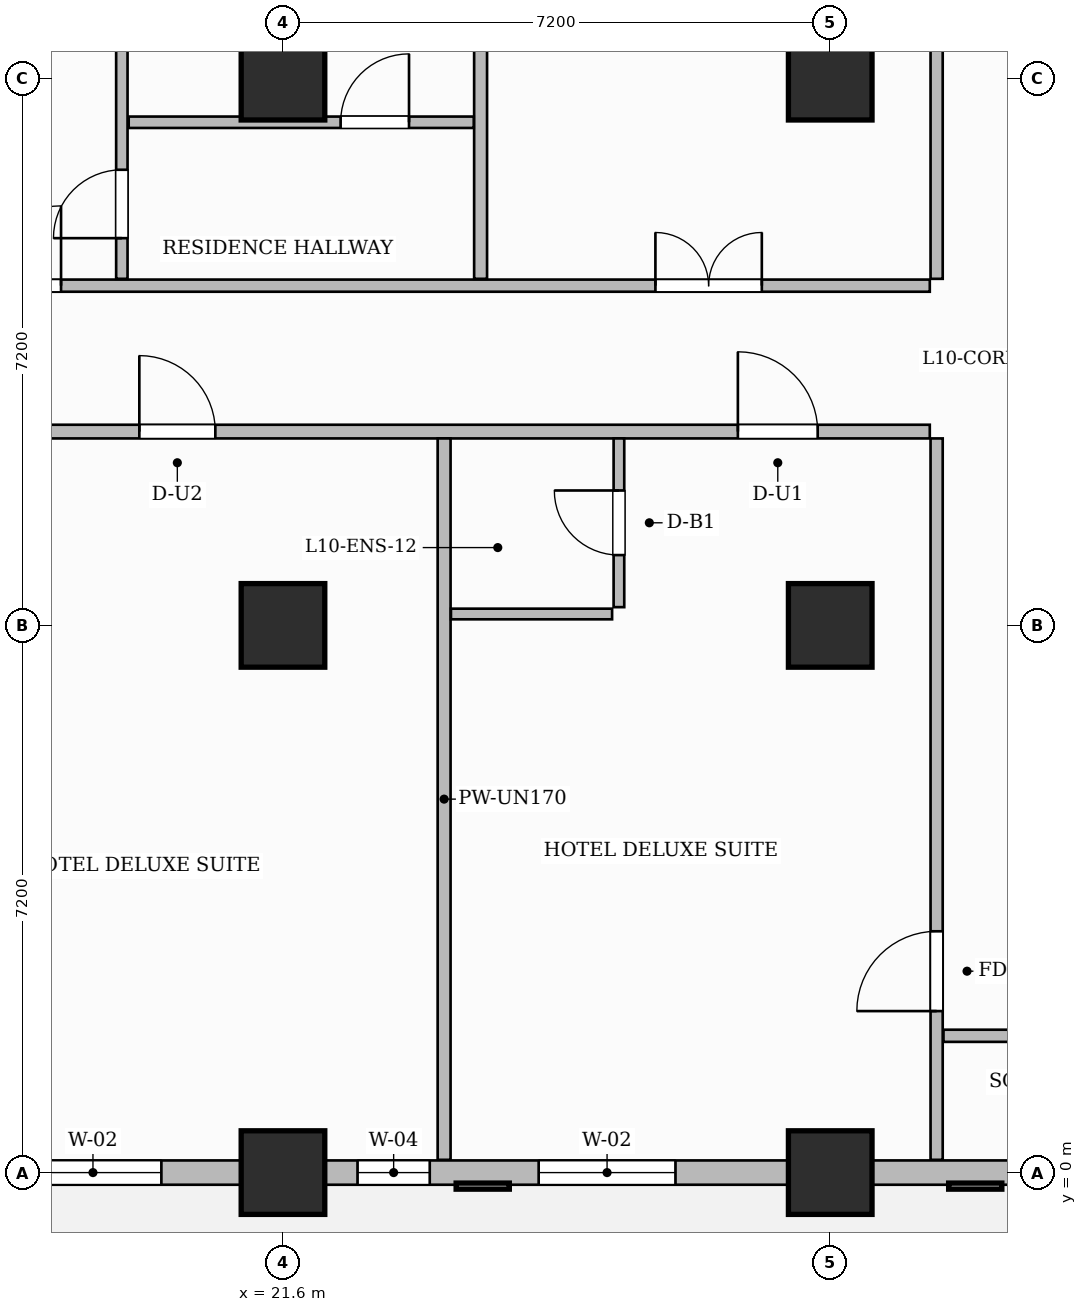
"""IFC4 building model, lengths in metres.
Left out: names, types, materials, properties, quantities, classifications, styles, units other than length and angle.
Written with IfcOpenShell. Run it as: python <this file> out.ifc"""

import sys

from ifc_helpers import new_model, si_unit, direction, frame, frame_2d, origin, origin_2d, place, context, subcontext, project, spatial, rectangle, extrude, source, transform, mapped, element, fill, save


model = new_model("IFC4")
c1 = context("Model", 3, precision=1e-05, world=origin(), true_north=direction((0.0, 1.0)))
c2 = subcontext(c1, "Body", "Model", "MODEL_VIEW")
j1 = project(units=[si_unit("LENGTHUNIT", "METRE"), si_unit("PLANEANGLEUNIT", "RADIAN")], contexts=[c1])
p1 = place(None, origin())
s1 = spatial("IfcSite", under=j1, at=p1, CompositionType="ELEMENT")
p2 = place(p1, origin())
s2 = spatial("IfcBuilding", under=s1, at=p2, CompositionType="ELEMENT")
p3 = place(p2, frame((0.0, 0.0, 47.2)))
s3 = spatial("IfcBuildingStorey", under=s2, at=p3, CompositionType="ELEMENT", Elevation=47.2)
m1 = source(origin(), c2, "Body", "SweptSolid", [
    extrude(rectangle(XDim=1.1, YDim=1.1, at=origin_2d()), origin(), (0.0, 0.0, 1.0), 3.7),
])
for number, where, z_axis, x_axis in (
    (1, (21.6, 0.0, 0.0), (0.0, 0.0, 1.0), (1.0, 0.0, 0.0)),
    (2, (21.6, 7.2, 0.0), (0.0, 0.0, 1.0), (1.0, 0.0, 0.0)),
    (3, (21.6, 14.4, 0.0), (0.0, 0.0, 1.0), (1.0, 0.0, 0.0)),
    (4, (28.8, 0.0, 0.0), (0.0, 0.0, 1.0), (1.0, 0.0, 0.0)),
    (5, (28.8, 7.2, 0.0), (0.0, 0.0, 1.0), (1.0, 0.0, 0.0)),
    (6, (28.8, 14.4, 0.0), (0.0, 0.0, 1.0), (1.0, 0.0, 0.0)),
):
    element("IfcColumn", number, at=place(p3, frame(where, z_axis=z_axis, x_axis=x_axis)), inside=s3, PredefinedType="COLUMN", context=c2, shape_type="MappedRepresentation", body=[
        mapped(m1, transform((0.0, 0.0, 0.0), scale=1.0)),
    ])
p4 = place(p3, frame((14.568, 9.75, 0.0), z_axis=(0.0, 0.0, 1.0), x_axis=(1.0, 0.0, 0.0)))
e7 = element("IfcWall", 7, at=p4, inside=s3, PredefinedType="PARTITIONING", context=c2, shape_type="SweptSolid", body=[
    extrude(rectangle(XDim=15.542, YDim=0.18, at=frame_2d((7.771, 0.0))), origin(), (0.0, 0.0, 1.0), 3.45),
])
p5 = place(p4, frame((5.142, 0.0, 0.0)))
e8 = element("IfcOpeningElement", 8, at=p5, cuts=e7, PredefinedType="OPENING", context=c2, shape_type="SweptSolid", body=[
    extrude(rectangle(XDim=1.0, YDim=2.2, at=frame_2d((0.5, 1.1))), frame((0.0, 0.1, 0.0), z_axis=(0.0, -1.0, 0.0), x_axis=(1.0, 0.0, 0.0)), (0.0, 0.0, 1.0), 0.2),
])
p6 = place(p4, frame((13.017, 0.0, 0.0)))
e9 = element("IfcOpeningElement", 9, at=p6, cuts=e7, PredefinedType="OPENING", context=c2, shape_type="SweptSolid", body=[
    extrude(rectangle(XDim=1.05, YDim=2.25, at=frame_2d((0.525, 1.125))), frame((0.0, 0.1, 0.0), z_axis=(0.0, -1.0, 0.0), x_axis=(1.0, 0.0, 0.0)), (0.0, 0.0, 1.0), 0.2),
])
p7 = place(p3, frame((14.568, 11.67, 0.0), z_axis=(0.0, 0.0, 1.0), x_axis=(1.0, 0.0, 0.0)))
e10 = element("IfcWall", 10, at=p7, inside=s3, PredefinedType="PARTITIONING", context=c2, shape_type="SweptSolid", body=[
    extrude(rectangle(XDim=15.542, YDim=0.16, at=frame_2d((7.771, 0.0))), origin(), (0.0, 0.0, 1.0), 3.45),
])
p8 = place(p7, frame((3.062, 0.0, 0.0)))
e11 = element("IfcOpeningElement", 11, at=p8, cuts=e10, PredefinedType="OPENING", context=c2, shape_type="SweptSolid", body=[
    extrude(rectangle(XDim=1.05, YDim=2.25, at=frame_2d((0.525, 1.125))), frame((0.0, 0.09, 0.0), z_axis=(0.0, -1.0, 0.0), x_axis=(1.0, 0.0, 0.0)), (0.0, 0.0, 1.0), 0.18),
])
p9 = place(p7, frame((11.932, 0.0, 0.0)))
e12 = element("IfcOpeningElement", 12, at=p9, cuts=e10, PredefinedType="OPENING", context=c2, shape_type="SweptSolid", body=[
    extrude(rectangle(XDim=1.4, YDim=2.35, at=frame_2d((0.7, 1.175))), frame((0.0, 0.09, 0.0), z_axis=(0.0, -1.0, 0.0), x_axis=(1.0, 0.0, 0.0)), (0.0, 0.0, 1.0), 0.18),
])
p10 = place(p3, frame((30.2, 11.76, 0.0), z_axis=(0.0, 0.0, 1.0), x_axis=(0.0, 1.0, 0.0)))
e13 = element("IfcWall", 13, at=p10, inside=s3, PredefinedType="PARTITIONING", context=c2, shape_type="SweptSolid", body=[
    extrude(rectangle(XDim=9.7, YDim=0.16, at=frame_2d((4.85, 0.0))), origin(), (0.0, 0.0, 1.0), 3.45),
])
p11 = place(p3, frame((30.2, 0.168, 0.0), z_axis=(0.0, 0.0, 1.0), x_axis=(0.0, 1.0, 0.0)))
e14 = element("IfcWall", 14, at=p11, inside=s3, PredefinedType="PARTITIONING", context=c2, shape_type="SweptSolid", body=[
    extrude(rectangle(XDim=9.492, YDim=0.16, at=frame_2d((4.746, 0.0))), origin(), (0.0, 0.0, 1.0), 3.45),
])
p12 = place(p11, frame((1.957, 0.0, 0.0)))
e15 = element("IfcOpeningElement", 15, at=p12, cuts=e14, PredefinedType="OPENING", context=c2, shape_type="SweptSolid", body=[
    extrude(rectangle(XDim=1.05, YDim=2.15, at=frame_2d((0.525, 1.075))), frame((0.0, 0.09, 0.0), z_axis=(0.0, -1.0, 0.0), x_axis=(1.0, 0.0, 0.0)), (0.0, 0.0, 1.0), 0.18),
])
p13 = place(p3, frame((30.29, 1.8, 0.0), z_axis=(0.0, 0.0, 1.0), x_axis=(1.0, 0.0, 0.0)))
e16 = element("IfcWall", 16, at=p13, inside=s3, PredefinedType="PARTITIONING", context=c2, shape_type="SweptSolid", body=[
    extrude(rectangle(XDim=19.37, YDim=0.16, at=frame_2d((9.685, 0.0))), origin(), (0.0, 0.0, 1.0), 3.45),
])
p14 = place(p13, frame((5.213, 0.0, 0.0)))
e17 = element("IfcOpeningElement", 17, at=p14, cuts=e16, PredefinedType="OPENING", context=c2, shape_type="SweptSolid", body=[
    extrude(rectangle(XDim=0.9, YDim=2.15, at=frame_2d((0.45, 1.075))), frame((0.0, 0.09, 0.0), z_axis=(0.0, -1.0, 0.0), x_axis=(1.0, 0.0, 0.0)), (0.0, 0.0, 1.0), 0.18),
])
p15 = place(p13, frame((14.06, 0.0, 0.0)))
e18 = element("IfcOpeningElement", 18, at=p15, cuts=e16, PredefinedType="OPENING", context=c2, shape_type="SweptSolid", body=[
    extrude(rectangle(XDim=0.9, YDim=2.15, at=frame_2d((0.45, 1.075))), frame((0.0, 0.09, 0.0), z_axis=(0.0, -1.0, 0.0), x_axis=(1.0, 0.0, 0.0)), (0.0, 0.0, 1.0), 0.18),
])
p16 = place(p3, frame((23.72, 0.168, 0.0), z_axis=(0.0, 0.0, 1.0), x_axis=(0.0, 1.0, 0.0)))
e19 = element("IfcWall", 19, at=p16, inside=s3, PredefinedType="PARTITIONING", context=c2, shape_type="SweptSolid", body=[
    extrude(rectangle(XDim=9.492, YDim=0.17, at=frame_2d((4.746, 0.0))), origin(), (0.0, 0.0, 1.0), 3.45),
])
p17 = place(p3, frame((26.02, 7.44, 0.0), z_axis=(0.0, 0.0, 1.0), x_axis=(0.0, 1.0, 0.0)))
e20 = element("IfcWall", 20, at=p17, inside=s3, PredefinedType="PARTITIONING", context=c2, shape_type="SweptSolid", body=[
    extrude(rectangle(XDim=2.22, YDim=0.14, at=frame_2d((1.11, 0.0))), origin(), (0.0, 0.0, 1.0), 3.45),
])
p18 = place(p17, frame((0.685, 0.0, 0.0)))
e21 = element("IfcOpeningElement", 21, at=p18, cuts=e20, PredefinedType="OPENING", context=c2, shape_type="SweptSolid", body=[
    extrude(rectangle(XDim=0.85, YDim=2.1, at=frame_2d((0.425, 1.05))), frame((0.0, 0.08, 0.0), z_axis=(0.0, -1.0, 0.0), x_axis=(1.0, 0.0, 0.0)), (0.0, 0.0, 1.0), 0.16),
])
p19 = place(p3, frame((23.81, 7.35, 0.0), z_axis=(0.0, 0.0, 1.0), x_axis=(1.0, 0.0, 0.0)))
e22 = element("IfcWall", 22, at=p19, inside=s3, PredefinedType="PARTITIONING", context=c2, shape_type="SweptSolid", body=[
    extrude(rectangle(XDim=2.12, YDim=0.14, at=frame_2d((1.06, 0.0))), origin(), (0.0, 0.0, 1.0), 2.885),
])
p20 = place(p3, frame((24.2, 11.76, 0.0), z_axis=(0.0, 0.0, 1.0), x_axis=(0.0, 1.0, 0.0)))
e23 = element("IfcWall", 23, at=p20, inside=s3, PredefinedType="PARTITIONING", context=c2, shape_type="SweptSolid", body=[
    extrude(rectangle(XDim=9.672, YDim=0.17, at=frame_2d((4.836, 0.0))), origin(), (0.0, 0.0, 1.0), 3.45),
])
p21 = place(p3, frame((19.48, 11.76, 0.0), z_axis=(0.0, 0.0, 1.0), x_axis=(0.0, 1.0, 0.0)))
e24 = element("IfcWall", 24, at=p21, inside=s3, PredefinedType="PARTITIONING", context=c2, shape_type="SweptSolid", body=[
    extrude(rectangle(XDim=9.672, YDim=0.15, at=frame_2d((4.836, 0.0))), origin(), (0.0, 0.0, 1.0), 3.45),
])
p22 = place(p21, frame((0.535, 0.0, 0.0)))
e25 = element("IfcOpeningElement", 25, at=p22, cuts=e24, PredefinedType="OPENING", context=c2, shape_type="SweptSolid", body=[
    extrude(rectangle(XDim=0.9, YDim=2.15, at=frame_2d((0.45, 1.075))), frame((0.0, 0.085, 0.0), z_axis=(0.0, -1.0, 0.0), x_axis=(1.0, 0.0, 0.0)), (0.0, 0.0, 1.0), 0.17),
])
p23 = place(p3, frame((19.57, 13.82, 0.0), z_axis=(0.0, 0.0, 1.0), x_axis=(1.0, 0.0, 0.0)))
e26 = element("IfcWall", 26, at=p23, inside=s3, PredefinedType="PARTITIONING", context=c2, shape_type="SweptSolid", body=[
    extrude(rectangle(XDim=4.54, YDim=0.15, at=frame_2d((2.27, 0.0))), origin(), (0.0, 0.0, 1.0), 3.45),
])
p24 = place(p23, frame((2.788, 0.0, 0.0)))
e27 = element("IfcOpeningElement", 27, at=p24, cuts=e26, PredefinedType="OPENING", context=c2, shape_type="SweptSolid", body=[
    extrude(rectangle(XDim=0.9, YDim=2.15, at=frame_2d((0.45, 1.075))), frame((0.0, 0.085, 0.0), z_axis=(0.0, -1.0, 0.0), x_axis=(1.0, 0.0, 0.0)), (0.0, 0.0, 1.0), 0.17),
])
p25 = place(p3, frame((14.4, 0.0, 0.0), z_axis=(0.0, 0.0, 1.0), x_axis=(1.0, 0.0, 0.0)))
e28 = element("IfcWall", 28, at=p25, inside=s3, PredefinedType="SOLIDWALL", context=c2, shape_type="SweptSolid", body=[
    extrude(rectangle(XDim=43.2, YDim=0.32, at=frame_2d((21.6, 0.0))), origin(), (0.0, 0.0, 1.0), 2.885),
])
p26 = place(p25, frame((1.5, 0.0, 0.0)))
e29 = element("IfcOpeningElement", 29, at=p26, cuts=e28, PredefinedType="OPENING", context=c2, shape_type="SweptSolid", body=[
    extrude(rectangle(XDim=1.2, YDim=2.2, at=frame_2d((0.6, 1.1))), frame((0.0, 0.17, 0.0), z_axis=(0.0, -1.0, 0.0), x_axis=(1.0, 0.0, 0.0)), (0.0, 0.0, 1.0), 0.34),
])
p27 = place(p25, frame((3.8, 0.0, 0.8)))
e30 = element("IfcOpeningElement", 30, at=p27, cuts=e28, PredefinedType="OPENING", context=c2, shape_type="SweptSolid", body=[
    extrude(rectangle(XDim=1.8, YDim=1.85, at=frame_2d((0.9, 0.925))), frame((0.0, 0.17, 0.0), z_axis=(0.0, -1.0, 0.0), x_axis=(1.0, 0.0, 0.0)), (0.0, 0.0, 1.0), 0.34),
])
p28 = place(p25, frame((8.181, 0.0, 0.8)))
e31 = element("IfcOpeningElement", 31, at=p28, cuts=e28, PredefinedType="OPENING", context=c2, shape_type="SweptSolid", body=[
    extrude(rectangle(XDim=0.95, YDim=1.75, at=frame_2d((0.475, 0.875))), frame((0.0, 0.17, 0.0), z_axis=(0.0, -1.0, 0.0), x_axis=(1.0, 0.0, 0.0)), (0.0, 0.0, 1.0), 0.34),
])
p29 = place(p25, frame((10.564, 0.0, 0.8)))
e32 = element("IfcOpeningElement", 32, at=p29, cuts=e28, PredefinedType="OPENING", context=c2, shape_type="SweptSolid", body=[
    extrude(rectangle(XDim=1.8, YDim=1.85, at=frame_2d((0.9, 0.925))), frame((0.0, 0.17, 0.0), z_axis=(0.0, -1.0, 0.0), x_axis=(1.0, 0.0, 0.0)), (0.0, 0.0, 1.0), 0.34),
])
p30 = place(p25, frame((16.804, 0.0, 0.8)))
e33 = element("IfcOpeningElement", 33, at=p30, cuts=e28, PredefinedType="OPENING", context=c2, shape_type="SweptSolid", body=[
    extrude(rectangle(XDim=1.8, YDim=1.85, at=frame_2d((0.9, 0.925))), frame((0.0, 0.17, 0.0), z_axis=(0.0, -1.0, 0.0), x_axis=(1.0, 0.0, 0.0)), (0.0, 0.0, 1.0), 0.34),
])
p31 = place(p25, frame((22.396, 0.0, 0.8)))
e34 = element("IfcOpeningElement", 34, at=p31, cuts=e28, PredefinedType="OPENING", context=c2, shape_type="SweptSolid", body=[
    extrude(rectangle(XDim=1.8, YDim=1.85, at=frame_2d((0.9, 0.925))), frame((0.0, 0.17, 0.0), z_axis=(0.0, -1.0, 0.0), x_axis=(1.0, 0.0, 0.0)), (0.0, 0.0, 1.0), 0.34),
])
p32 = place(p25, frame((25.629, 0.0, 0.8)))
e35 = element("IfcOpeningElement", 35, at=p32, cuts=e28, PredefinedType="OPENING", context=c2, shape_type="SweptSolid", body=[
    extrude(rectangle(XDim=0.95, YDim=1.75, at=frame_2d((0.475, 0.875))), frame((0.0, 0.17, 0.0), z_axis=(0.0, -1.0, 0.0), x_axis=(1.0, 0.0, 0.0)), (0.0, 0.0, 1.0), 0.34),
])
p33 = place(p25, frame((29.075, 0.0, 0.8)))
e36 = element("IfcOpeningElement", 36, at=p33, cuts=e28, PredefinedType="OPENING", context=c2, shape_type="SweptSolid", body=[
    extrude(rectangle(XDim=1.8, YDim=1.85, at=frame_2d((0.9, 0.925))), frame((0.0, 0.17, 0.0), z_axis=(0.0, -1.0, 0.0), x_axis=(1.0, 0.0, 0.0)), (0.0, 0.0, 1.0), 0.34),
])
p34 = place(p25, frame((32.125, 0.0, 0.8)))
e37 = element("IfcOpeningElement", 37, at=p34, cuts=e28, PredefinedType="OPENING", context=c2, shape_type="SweptSolid", body=[
    extrude(rectangle(XDim=1.8, YDim=1.85, at=frame_2d((0.9, 0.925))), frame((0.0, 0.17, 0.0), z_axis=(0.0, -1.0, 0.0), x_axis=(1.0, 0.0, 0.0)), (0.0, 0.0, 1.0), 0.34),
])
p35 = place(p25, frame((36.946, 0.0, 0.8)))
e38 = element("IfcOpeningElement", 38, at=p35, cuts=e28, PredefinedType="OPENING", context=c2, shape_type="SweptSolid", body=[
    extrude(rectangle(XDim=1.8, YDim=1.85, at=frame_2d((0.9, 0.925))), frame((0.0, 0.17, 0.0), z_axis=(0.0, -1.0, 0.0), x_axis=(1.0, 0.0, 0.0)), (0.0, 0.0, 1.0), 0.34),
])
p36 = place(p25, frame((40.054, 0.0, 0.8)))
e39 = element("IfcOpeningElement", 39, at=p36, cuts=e28, PredefinedType="OPENING", context=c2, shape_type="SweptSolid", body=[
    extrude(rectangle(XDim=1.8, YDim=1.85, at=frame_2d((0.9, 0.925))), frame((0.0, 0.17, 0.0), z_axis=(0.0, -1.0, 0.0), x_axis=(1.0, 0.0, 0.0)), (0.0, 0.0, 1.0), 0.34),
])
m2 = source(origin(), c2, "Body", "SweptSolid", [
    extrude(rectangle(XDim=1.05, YDim=2.15, at=frame_2d((0.525, 1.075))), frame((0.0, 0.025, 0.0), z_axis=(0.0, -1.0, 0.0), x_axis=(1.0, 0.0, 0.0)), (0.0, 0.0, 1.0), 0.05),
])
p37 = place(p12, origin())
e40 = element("IfcDoor", 40, at=p37, inside=s3, OperationType="SINGLE_SWING_LEFT", PredefinedType="DOOR", context=c2, shape_type="MappedRepresentation", body=[
    mapped(m2, transform((0.0, 0.0, 0.0), scale=1.0)),
])
fill(e15, e40)
m3 = source(origin(), c2, "Body", "SweptSolid", [
    extrude(rectangle(XDim=1.0, YDim=2.2, at=frame_2d((0.5, 1.1))), frame((0.0, 0.025, 0.0), z_axis=(0.0, -1.0, 0.0), x_axis=(1.0, 0.0, 0.0)), (0.0, 0.0, 1.0), 0.05),
])
p38 = place(p5, origin())
e41 = element("IfcDoor", 41, at=p38, inside=s3, OperationType="SINGLE_SWING_LEFT", PredefinedType="DOOR", context=c2, shape_type="MappedRepresentation", body=[
    mapped(m3, transform((0.0, 0.0, 0.0), scale=1.0)),
])
fill(e8, e41)
m4 = source(origin(), c2, "Body", "SweptSolid", [
    extrude(rectangle(XDim=0.85, YDim=2.1, at=frame_2d((0.425, 1.05))), frame((0.0, 0.025, 0.0), z_axis=(0.0, -1.0, 0.0), x_axis=(1.0, 0.0, 0.0)), (0.0, 0.0, 1.0), 0.05),
])
p39 = place(p18, origin())
e42 = element("IfcDoor", 42, at=p39, inside=s3, OperationType="SINGLE_SWING_RIGHT", PredefinedType="DOOR", context=c2, shape_type="MappedRepresentation", body=[
    mapped(m4, transform((0.0, 0.0, 0.0), scale=1.0)),
])
fill(e21, e42)
m5 = source(origin(), c2, "Body", "SweptSolid", [
    extrude(rectangle(XDim=1.05, YDim=2.25, at=frame_2d((0.525, 1.125))), frame((0.0, 0.025, 0.0), z_axis=(0.0, -1.0, 0.0), x_axis=(1.0, 0.0, 0.0)), (0.0, 0.0, 1.0), 0.05),
])
p40 = place(p6, origin())
e43 = element("IfcDoor", 43, at=p40, inside=s3, OperationType="SINGLE_SWING_LEFT", PredefinedType="DOOR", context=c2, shape_type="MappedRepresentation", body=[
    mapped(m5, transform((0.0, 0.0, 0.0), scale=1.0)),
])
fill(e9, e43)
p41 = place(p8, origin())
e44 = element("IfcDoor", 44, at=p41, inside=s3, OperationType="SINGLE_SWING_RIGHT", PredefinedType="DOOR", context=c2, shape_type="MappedRepresentation", body=[
    mapped(m5, transform((0.0, 0.0, 0.0), scale=1.0)),
])
fill(e11, e44)
m6 = source(origin(), c2, "Body", "SweptSolid", [
    extrude(rectangle(XDim=0.9, YDim=2.15, at=frame_2d((0.45, 1.075))), frame((0.0, 0.025, 0.0), z_axis=(0.0, -1.0, 0.0), x_axis=(1.0, 0.0, 0.0)), (0.0, 0.0, 1.0), 0.05),
])
p42 = place(p22, origin())
e45 = element("IfcDoor", 45, at=p42, inside=s3, OperationType="SINGLE_SWING_LEFT", PredefinedType="DOOR", context=c2, shape_type="MappedRepresentation", body=[
    mapped(m6, transform((0.0, 0.0, 0.0), scale=1.0)),
])
fill(e25, e45)
p43 = place(p24, origin())
e46 = element("IfcDoor", 46, at=p43, inside=s3, OperationType="SINGLE_SWING_RIGHT", PredefinedType="DOOR", context=c2, shape_type="MappedRepresentation", body=[
    mapped(m6, transform((0.0, 0.0, 0.0), scale=1.0)),
])
fill(e27, e46)
m7 = source(origin(), c2, "Body", "SweptSolid", [
    extrude(rectangle(XDim=1.4, YDim=2.35, at=frame_2d((0.7, 1.175))), frame((0.0, 0.025, 0.0), z_axis=(0.0, -1.0, 0.0), x_axis=(1.0, 0.0, 0.0)), (0.0, 0.0, 1.0), 0.05),
])
p44 = place(p9, origin())
e47 = element("IfcDoor", 47, at=p44, inside=s3, OperationType="DOUBLE_DOOR_SINGLE_SWING", PredefinedType="DOOR", context=c2, shape_type="MappedRepresentation", body=[
    mapped(m7, transform((0.0, 0.0, 0.0), scale=1.0)),
])
fill(e12, e47)
m8 = source(origin(), c2, "Body", "SweptSolid", [
    extrude(rectangle(XDim=1.8, YDim=1.85, at=frame_2d((0.9, 0.925))), frame((0.0, 0.03, 0.0), z_axis=(0.0, -1.0, 0.0), x_axis=(1.0, 0.0, 0.0)), (0.0, 0.0, 1.0), 0.06),
])
p45 = place(p27, origin())
e48 = element("IfcWindow", 48, at=p45, inside=s3, PartitioningType="DOUBLE_PANEL_VERTICAL", PredefinedType="WINDOW", context=c2, shape_type="MappedRepresentation", body=[
    mapped(m8, transform((0.0, 0.0, 0.0), scale=1.0)),
])
fill(e30, e48)
m9 = source(origin(), c2, "Body", "SweptSolid", [
    extrude(rectangle(XDim=0.95, YDim=1.75, at=frame_2d((0.475, 0.875))), frame((0.0, 0.03, 0.0), z_axis=(0.0, -1.0, 0.0), x_axis=(1.0, 0.0, 0.0)), (0.0, 0.0, 1.0), 0.06),
])
p46 = place(p28, origin())
e49 = element("IfcWindow", 49, at=p46, inside=s3, PartitioningType="SINGLE_PANEL", PredefinedType="WINDOW", context=c2, shape_type="MappedRepresentation", body=[
    mapped(m9, transform((0.0, 0.0, 0.0), scale=1.0)),
])
fill(e31, e49)
p47 = place(p29, origin())
e50 = element("IfcWindow", 50, at=p47, inside=s3, PartitioningType="DOUBLE_PANEL_VERTICAL", PredefinedType="WINDOW", context=c2, shape_type="MappedRepresentation", body=[
    mapped(m8, transform((0.0, 0.0, 0.0), scale=1.0)),
])
fill(e32, e50)
save(model, sys.argv[1])
